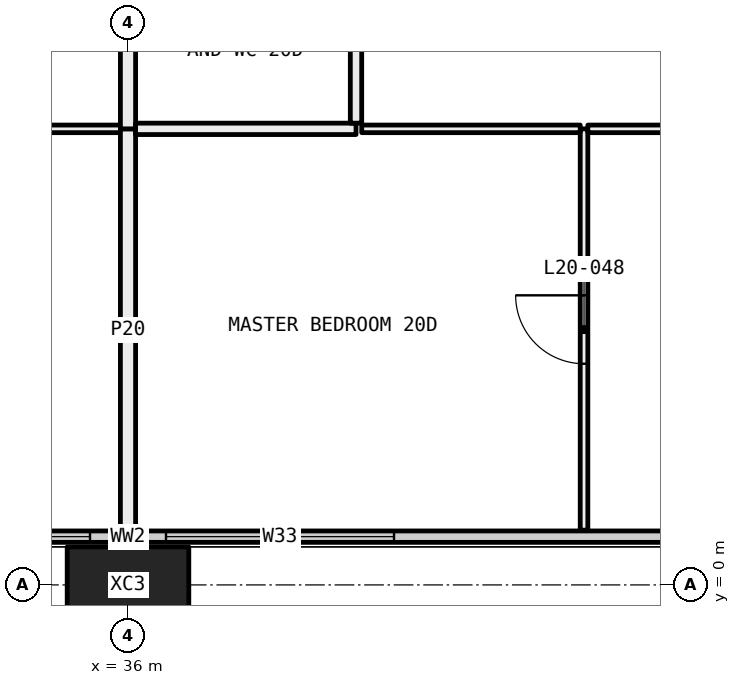
"""IFC4 building model, lengths in metres.
Left out: names, types, materials, properties, quantities, classifications, styles, units other than length and angle.
Written with IfcOpenShell. Run it as: python <this file> out.ifc"""

import sys

from ifc_helpers import new_model, si_unit, direction, frame, frame_2d, origin, origin_2d, place, context, subcontext, project, spatial, rectangle, hollow_rectangle, extrude, element, fill, save


model = new_model("IFC4")
c1 = context("Model", 3, precision=1e-05, world=origin(), true_north=direction((0.0, 1.0)))
c2 = subcontext(c1, "Body", "Model", "MODEL_VIEW")
j1 = project(units=[si_unit("LENGTHUNIT", "METRE"), si_unit("PLANEANGLEUNIT", "RADIAN")], contexts=[c1])
p1 = place(None, origin())
s1 = spatial("IfcSite", under=j1, at=p1, CompositionType="ELEMENT")
p2 = place(p1, origin())
s2 = spatial("IfcBuilding", under=s1, at=p2, CompositionType="ELEMENT")
p3 = place(p2, frame((0.0, 0.0, 81.75)))
s3 = spatial("IfcBuildingStorey", under=s2, at=p3, CompositionType="ELEMENT", Elevation=81.75)
p4 = place(p3, frame((36.0, 0.0, -0.4), z_axis=(0.0, 0.0, 1.0), x_axis=(1.0, 0.0, 0.0)))
e1 = element("IfcColumn", 1, at=p4, inside=s3, PredefinedType="COLUMN", context=c2, shape_type="SweptSolid", body=[
    extrude(hollow_rectangle(XDim=1.6, YDim=1.0, WallThickness=0.065, at=origin_2d()), origin(), (0.0, 0.0, 1.0), 3.45),
])
p5 = place(p3, frame((6.56, 0.635, 0.0), z_axis=(0.0, 0.0, 1.0), x_axis=(1.0, 0.0, 0.0)))
e2 = element("IfcWall", 2, at=p5, inside=s3, PredefinedType="ELEMENTEDWALL", context=c2, shape_type="SweptSolid", body=[
    extrude(rectangle(XDim=58.88, YDim=0.15, at=frame_2d((29.44, 0.0))), origin(), (0.0, 0.0, 1.0), 3.05),
])
p6 = place(p5, frame((0.44, 0.0, 0.45)))
e3 = element("IfcOpeningElement", 3, at=p6, cuts=e2, PredefinedType="OPENING", context=c2, shape_type="SweptSolid", body=[
    extrude(rectangle(XDim=4.5, YDim=2.55, at=frame_2d((2.25, 1.275))), frame((0.0, 0.085, 0.0), z_axis=(0.0, -1.0, 0.0), x_axis=(1.0, 0.0, 0.0)), (0.0, 0.0, 1.0), 0.17),
])
p7 = place(p5, frame((5.94, 0.0, 0.45)))
e4 = element("IfcOpeningElement", 4, at=p7, cuts=e2, PredefinedType="OPENING", context=c2, shape_type="SweptSolid", body=[
    extrude(rectangle(XDim=3.0, YDim=2.55, at=frame_2d((1.5, 1.275))), frame((0.0, 0.085, 0.0), z_axis=(0.0, -1.0, 0.0), x_axis=(1.0, 0.0, 0.0)), (0.0, 0.0, 1.0), 0.17),
])
p8 = place(p5, frame((13.94, 0.0, 0.45)))
e5 = element("IfcOpeningElement", 5, at=p8, cuts=e2, PredefinedType="OPENING", context=c2, shape_type="SweptSolid", body=[
    extrude(rectangle(XDim=3.0, YDim=2.55, at=frame_2d((1.5, 1.275))), frame((0.0, 0.085, 0.0), z_axis=(0.0, -1.0, 0.0), x_axis=(1.0, 0.0, 0.0)), (0.0, 0.0, 1.0), 0.17),
])
p9 = place(p5, frame((17.94, 0.0, 0.45)))
e6 = element("IfcOpeningElement", 6, at=p9, cuts=e2, PredefinedType="OPENING", context=c2, shape_type="SweptSolid", body=[
    extrude(rectangle(XDim=3.0, YDim=2.55, at=frame_2d((1.5, 1.275))), frame((0.0, 0.085, 0.0), z_axis=(0.0, -1.0, 0.0), x_axis=(1.0, 0.0, 0.0)), (0.0, 0.0, 1.0), 0.17),
])
p10 = place(p5, frame((26.94, 0.0, 0.45)))
e7 = element("IfcOpeningElement", 7, at=p10, cuts=e2, PredefinedType="OPENING", context=c2, shape_type="SweptSolid", body=[
    extrude(rectangle(XDim=2.0, YDim=2.55, at=frame_2d((1.0, 1.275))), frame((0.0, 0.085, 0.0), z_axis=(0.0, -1.0, 0.0), x_axis=(1.0, 0.0, 0.0)), (0.0, 0.0, 1.0), 0.17),
])
p11 = place(p5, frame((29.94, 0.0, 0.45)))
e8 = element("IfcOpeningElement", 8, at=p11, cuts=e2, PredefinedType="OPENING", context=c2, shape_type="SweptSolid", body=[
    extrude(rectangle(XDim=3.0, YDim=2.55, at=frame_2d((1.5, 1.275))), frame((0.0, 0.085, 0.0), z_axis=(0.0, -1.0, 0.0), x_axis=(1.0, 0.0, 0.0)), (0.0, 0.0, 1.0), 0.17),
])
p12 = place(p5, frame((37.94, 0.0, 0.45)))
e9 = element("IfcOpeningElement", 9, at=p12, cuts=e2, PredefinedType="OPENING", context=c2, shape_type="SweptSolid", body=[
    extrude(rectangle(XDim=3.0, YDim=2.55, at=frame_2d((1.5, 1.275))), frame((0.0, 0.085, 0.0), z_axis=(0.0, -1.0, 0.0), x_axis=(1.0, 0.0, 0.0)), (0.0, 0.0, 1.0), 0.17),
])
p13 = place(p5, frame((41.94, 0.0, 0.45)))
e10 = element("IfcOpeningElement", 10, at=p13, cuts=e2, PredefinedType="OPENING", context=c2, shape_type="SweptSolid", body=[
    extrude(rectangle(XDim=3.0, YDim=2.55, at=frame_2d((1.5, 1.275))), frame((0.0, 0.085, 0.0), z_axis=(0.0, -1.0, 0.0), x_axis=(1.0, 0.0, 0.0)), (0.0, 0.0, 1.0), 0.17),
])
p14 = place(p5, frame((50.94, 0.0, 0.45)))
e11 = element("IfcOpeningElement", 11, at=p14, cuts=e2, PredefinedType="OPENING", context=c2, shape_type="SweptSolid", body=[
    extrude(rectangle(XDim=2.0, YDim=2.55, at=frame_2d((1.0, 1.275))), frame((0.0, 0.085, 0.0), z_axis=(0.0, -1.0, 0.0), x_axis=(1.0, 0.0, 0.0)), (0.0, 0.0, 1.0), 0.17),
])
p15 = place(p5, frame((53.94, 0.0, 0.45)))
e12 = element("IfcOpeningElement", 12, at=p15, cuts=e2, PredefinedType="OPENING", context=c2, shape_type="SweptSolid", body=[
    extrude(rectangle(XDim=4.5, YDim=2.55, at=frame_2d((2.25, 1.275))), frame((0.0, 0.085, 0.0), z_axis=(0.0, -1.0, 0.0), x_axis=(1.0, 0.0, 0.0)), (0.0, 0.0, 1.0), 0.17),
])
p16 = place(p3, frame((35.9, 6.0, 0.0), z_axis=(0.0, 0.0, 1.0), x_axis=(-1.0, 0.0, 0.0)))
e13 = element("IfcWall", 13, at=p16, inside=s3, PredefinedType="PARTITIONING", context=c2, shape_type="SweptSolid", body=[
    extrude(rectangle(XDim=2.9, YDim=0.1, at=frame_2d((1.45, 0.0))), origin(), (0.0, 0.0, 1.0), 3.05),
])
p17 = place(p3, frame((36.0, 0.72, 0.0), z_axis=(0.0, 0.0, 1.0), x_axis=(0.0, 1.0, 0.0)))
e14 = element("IfcWall", 14, at=p17, inside=s3, PredefinedType="PARTITIONING", context=c2, shape_type="SweptSolid", body=[
    extrude(rectangle(XDim=5.28, YDim=0.2, at=frame_2d((2.64, 0.0))), origin(), (0.0, 0.0, 1.0), 2.45),
])
p18 = place(p3, frame((36.0, 6.0, 0.0), z_axis=(0.0, 0.0, 1.0), x_axis=(0.0, 1.0, 0.0)))
e15 = element("IfcWall", 15, at=p18, inside=s3, PredefinedType="PARTITIONING", context=c2, shape_type="SweptSolid", body=[
    extrude(rectangle(XDim=5.2, YDim=0.2, at=frame_2d((2.6, 0.0))), origin(), (0.0, 0.0, 1.0), 2.45),
])
p19 = place(p3, frame((42.0, 0.72, 0.0), z_axis=(0.0, 0.0, 1.0), x_axis=(0.0, 1.0, 0.0)))
e16 = element("IfcWall", 16, at=p19, inside=s3, PredefinedType="PARTITIONING", context=c2, shape_type="SweptSolid", body=[
    extrude(rectangle(XDim=5.28, YDim=0.1, at=frame_2d((2.64, 0.0))), origin(), (0.0, 0.0, 1.0), 3.05),
])
p20 = place(p19, frame((2.19, 0.0, 0.0)))
e17 = element("IfcOpeningElement", 17, at=p20, cuts=e16, PredefinedType="OPENING", context=c2, shape_type="SweptSolid", body=[
    extrude(rectangle(XDim=0.9, YDim=2.1, at=frame_2d((0.45, 1.05))), frame((0.0, 0.06, 0.0), z_axis=(0.0, -1.0, 0.0), x_axis=(1.0, 0.0, 0.0)), (0.0, 0.0, 1.0), 0.12),
])
p21 = place(p3, frame((39.0, 6.0, 0.0), z_axis=(0.0, 0.0, 1.0), x_axis=(-1.0, 0.0, 0.0)))
e18 = element("IfcWall", 18, at=p21, inside=s3, PredefinedType="PARTITIONING", context=c2, shape_type="SweptSolid", body=[
    extrude(rectangle(XDim=2.9, YDim=0.15, at=frame_2d((1.45, 0.0))), origin(), (0.0, 0.0, 1.0), 3.05),
])
p22 = place(p3, frame((41.95, 6.0, 0.0), z_axis=(0.0, 0.0, 1.0), x_axis=(-1.0, 0.0, 0.0)))
e19 = element("IfcWall", 19, at=p22, inside=s3, PredefinedType="PARTITIONING", context=c2, shape_type="SweptSolid", body=[
    extrude(rectangle(XDim=2.875, YDim=0.1, at=frame_2d((1.438, 0.0))), origin(), (0.0, 0.0, 1.0), 3.05),
])
p23 = place(p3, frame((48.0, 6.0, 0.0), z_axis=(0.0, 0.0, 1.0), x_axis=(-1.0, 0.0, 0.0)))
e20 = element("IfcWall", 20, at=p23, inside=s3, PredefinedType="PARTITIONING", context=c2, shape_type="SweptSolid", body=[
    extrude(rectangle(XDim=5.95, YDim=0.1, at=frame_2d((2.975, 0.0))), origin(), (0.0, 0.0, 1.0), 2.45),
])
p24 = place(p3, frame((39.0, 6.075, 0.0), z_axis=(0.0, 0.0, 1.0), x_axis=(0.0, 1.0, 0.0)))
e21 = element("IfcWall", 21, at=p24, inside=s3, PredefinedType="PARTITIONING", context=c2, shape_type="SweptSolid", body=[
    extrude(rectangle(XDim=5.925, YDim=0.15, at=frame_2d((2.962, 0.0))), origin(), (0.0, 0.0, 1.0), 2.45),
])
p25 = place(p24, frame((2.512, 0.0, 0.0)))
e22 = element("IfcOpeningElement", 22, at=p25, cuts=e21, PredefinedType="OPENING", context=c2, shape_type="SweptSolid", body=[
    extrude(rectangle(XDim=0.9, YDim=2.1, at=frame_2d((0.45, 1.05))), frame((0.0, 0.085, 0.0), z_axis=(0.0, -1.0, 0.0), x_axis=(1.0, 0.0, 0.0)), (0.0, 0.0, 1.0), 0.17),
])
p26 = place(p10, origin())
e23 = element("IfcWindow", 23, at=p26, inside=s3, PartitioningType="SINGLE_PANEL", PredefinedType="WINDOW", context=c2, shape_type="SweptSolid", body=[
    extrude(rectangle(XDim=2.0, YDim=2.55, at=frame_2d((1.0, 1.275))), frame((0.0, 0.03, 0.0), z_axis=(0.0, -1.0, 0.0), x_axis=(1.0, 0.0, 0.0)), (0.0, 0.0, 1.0), 0.06),
])
fill(e7, e23)
p27 = place(p11, origin())
e24 = element("IfcWindow", 24, at=p27, inside=s3, PartitioningType="SINGLE_PANEL", PredefinedType="WINDOW", context=c2, shape_type="SweptSolid", body=[
    extrude(rectangle(XDim=3.0, YDim=2.55, at=frame_2d((1.5, 1.275))), frame((0.0, 0.03, 0.0), z_axis=(0.0, -1.0, 0.0), x_axis=(1.0, 0.0, 0.0)), (0.0, 0.0, 1.0), 0.06),
])
fill(e8, e24)
p28 = place(p20, origin())
e25 = element("IfcDoor", 25, at=p28, inside=s3, OperationType="SINGLE_SWING_LEFT", PredefinedType="DOOR", context=c2, shape_type="SweptSolid", body=[
    extrude(rectangle(XDim=0.9, YDim=2.1, at=frame_2d((0.45, 1.05))), frame((0.0, 0.025, 0.0), z_axis=(0.0, -1.0, 0.0), x_axis=(1.0, 0.0, 0.0)), (0.0, 0.0, 1.0), 0.05),
])
fill(e17, e25)
save(model, sys.argv[1])
